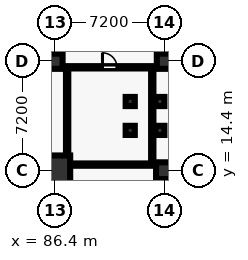
"""IFC4 building model, lengths in metres.
Left out: names, types, materials, properties, quantities, classifications, styles, units other than length and angle.
Written with IfcOpenShell. Run it as: python <this file> out.ifc"""

import sys

from ifc_helpers import new_model, si_unit, direction, frame, frame_2d, origin, origin_2d, place, context, subcontext, project, spatial, rectangle, circle, extrude, element, fill, save


model = new_model("IFC4")
c1 = context("Model", 3, precision=1e-05, world=origin(), true_north=direction((0.0, 1.0)))
c2 = subcontext(c1, "Body", "Model", "MODEL_VIEW")
j1 = project(units=[si_unit("LENGTHUNIT", "METRE"), si_unit("PLANEANGLEUNIT", "RADIAN")], contexts=[c1])
p1 = place(None, origin())
s1 = spatial("IfcSite", under=j1, at=p1, CompositionType="ELEMENT")
p2 = place(p1, origin())
s2 = spatial("IfcBuilding", under=s1, at=p2, CompositionType="ELEMENT")
p3 = place(p2, frame((0.0, 0.0, -5.4)))
s3 = spatial("IfcBuildingStorey", under=s2, at=p3, CompositionType="ELEMENT", Elevation=-5.4)
p4 = place(p3, frame((86.4, 14.4, 0.0), z_axis=(0.0, 0.0, 1.0), x_axis=(1.0, 0.0, 0.0)))
e1 = element("IfcColumn", 1, at=p4, inside=s3, PredefinedType="COLUMN", context=c2, shape_type="SweptSolid", body=[
    extrude(circle(Radius=1.0, at=origin_2d()), origin(), (0.0, 0.0, 1.0), 5.4),
])
p5 = place(p3, frame((86.4, 21.6, 0.0), z_axis=(0.0, 0.0, 1.0), x_axis=(1.0, 0.0, 0.0)))
e2 = element("IfcColumn", 2, at=p5, inside=s3, PredefinedType="COLUMN", context=c2, shape_type="SweptSolid", body=[
    extrude(rectangle(XDim=1.0, YDim=1.0, at=origin_2d()), origin(), (0.0, 0.0, 1.0), 5.4),
])
p6 = place(p3, frame((93.6, 14.4, 0.0), z_axis=(0.0, 0.0, 1.0), x_axis=(1.0, 0.0, 0.0)))
e3 = element("IfcColumn", 3, at=p6, inside=s3, PredefinedType="COLUMN", context=c2, shape_type="SweptSolid", body=[
    extrude(rectangle(XDim=1.1, YDim=1.1, at=origin_2d()), origin(), (0.0, 0.0, 1.0), 5.4),
])
p7 = place(p3, frame((93.6, 21.6, 0.0), z_axis=(0.0, 0.0, 1.0), x_axis=(1.0, 0.0, 0.0)))
e4 = element("IfcColumn", 4, at=p7, inside=s3, PredefinedType="COLUMN", context=c2, shape_type="SweptSolid", body=[
    extrude(rectangle(XDim=1.0, YDim=1.0, at=origin_2d()), origin(), (0.0, 0.0, 1.0), 5.4),
])
for number, where, z_axis, x_axis in (
    (5, (91.35, 17.05, 0.0), (0.0, 0.0, 1.0), (1.0, 0.0, 0.0)),
    (6, (93.3, 17.05, 0.0), (0.0, 0.0, 1.0), (1.0, 0.0, 0.0)),
    (7, (91.35, 18.95, 0.0), (0.0, 0.0, 1.0), (1.0, 0.0, 0.0)),
    (8, (93.3, 18.95, 0.0), (0.0, 0.0, 1.0), (1.0, 0.0, 0.0)),
):
    element("IfcColumn", number, at=place(p3, frame(where, z_axis=z_axis, x_axis=x_axis)), inside=s3, PredefinedType="COLUMN", context=c2, shape_type="SweptSolid", body=[
        extrude(rectangle(XDim=0.6, YDim=0.6, at=origin_2d()), origin(), (0.0, 0.0, 1.0), 5.4),
    ])
p8 = place(p3, frame((87.2, 14.8, 0.0), z_axis=(0.0, 0.0, 1.0), x_axis=(1.0, 0.0, 0.0)))
e9 = element("IfcWall", 9, at=p8, inside=s3, PredefinedType="PARTITIONING", context=c2, shape_type="SweptSolid", body=[
    extrude(rectangle(XDim=5.6, YDim=0.15, at=frame_2d((2.8, 0.0))), origin(), (0.0, 0.0, 1.0), 4.04),
])
p9 = place(p3, frame((92.8, 14.8, 0.0), z_axis=(0.0, 0.0, 1.0), x_axis=(0.0, 1.0, 0.0)))
e10 = element("IfcWall", 10, at=p9, inside=s3, PredefinedType="PARTITIONING", context=c2, shape_type="SweptSolid", body=[
    extrude(rectangle(XDim=6.4, YDim=0.15, at=frame_2d((3.2, 0.0))), origin(), (0.0, 0.0, 1.0), 4.04),
])
p10 = place(p3, frame((92.8, 21.2, 0.0), z_axis=(0.0, 0.0, 1.0), x_axis=(-1.0, 0.0, 0.0)))
e11 = element("IfcWall", 11, at=p10, inside=s3, PredefinedType="PARTITIONING", context=c2, shape_type="SweptSolid", body=[
    extrude(rectangle(XDim=5.6, YDim=0.15, at=frame_2d((2.8, 0.0))), origin(), (0.0, 0.0, 1.0), 4.04),
])
p11 = place(p10, frame((2.325, 0.0, 0.0)))
e12 = element("IfcOpeningElement", 12, at=p11, cuts=e11, PredefinedType="OPENING", context=c2, shape_type="SweptSolid", body=[
    extrude(rectangle(XDim=0.95, YDim=2.15, at=frame_2d((0.475, 1.075))), frame((0.0, 0.085, 0.0), z_axis=(0.0, -1.0, 0.0), x_axis=(1.0, 0.0, 0.0)), (0.0, 0.0, 1.0), 0.17),
])
p12 = place(p3, frame((87.2, 21.2, 0.0), z_axis=(0.0, 0.0, 1.0), x_axis=(0.0, -1.0, 0.0)))
e13 = element("IfcWall", 13, at=p12, inside=s3, PredefinedType="PARTITIONING", context=c2, shape_type="SweptSolid", body=[
    extrude(rectangle(XDim=6.4, YDim=0.15, at=frame_2d((3.2, 0.0))), origin(), (0.0, 0.0, 1.0), 4.04),
])
p13 = place(p11, frame((0.95, 0.0, 0.0), z_axis=(0.0, 0.0, 1.0), x_axis=(-1.0, 0.0, 0.0)))
e14 = element("IfcDoor", 14, at=p13, inside=s3, OperationType="SINGLE_SWING_RIGHT", PredefinedType="DOOR", context=c2, shape_type="SweptSolid", body=[
    extrude(rectangle(XDim=0.95, YDim=2.15, at=frame_2d((0.475, 1.075))), frame((0.0, 0.025, 0.0), z_axis=(0.0, -1.0, 0.0), x_axis=(1.0, 0.0, 0.0)), (0.0, 0.0, 1.0), 0.05),
])
fill(e12, e14)
save(model, sys.argv[1])
